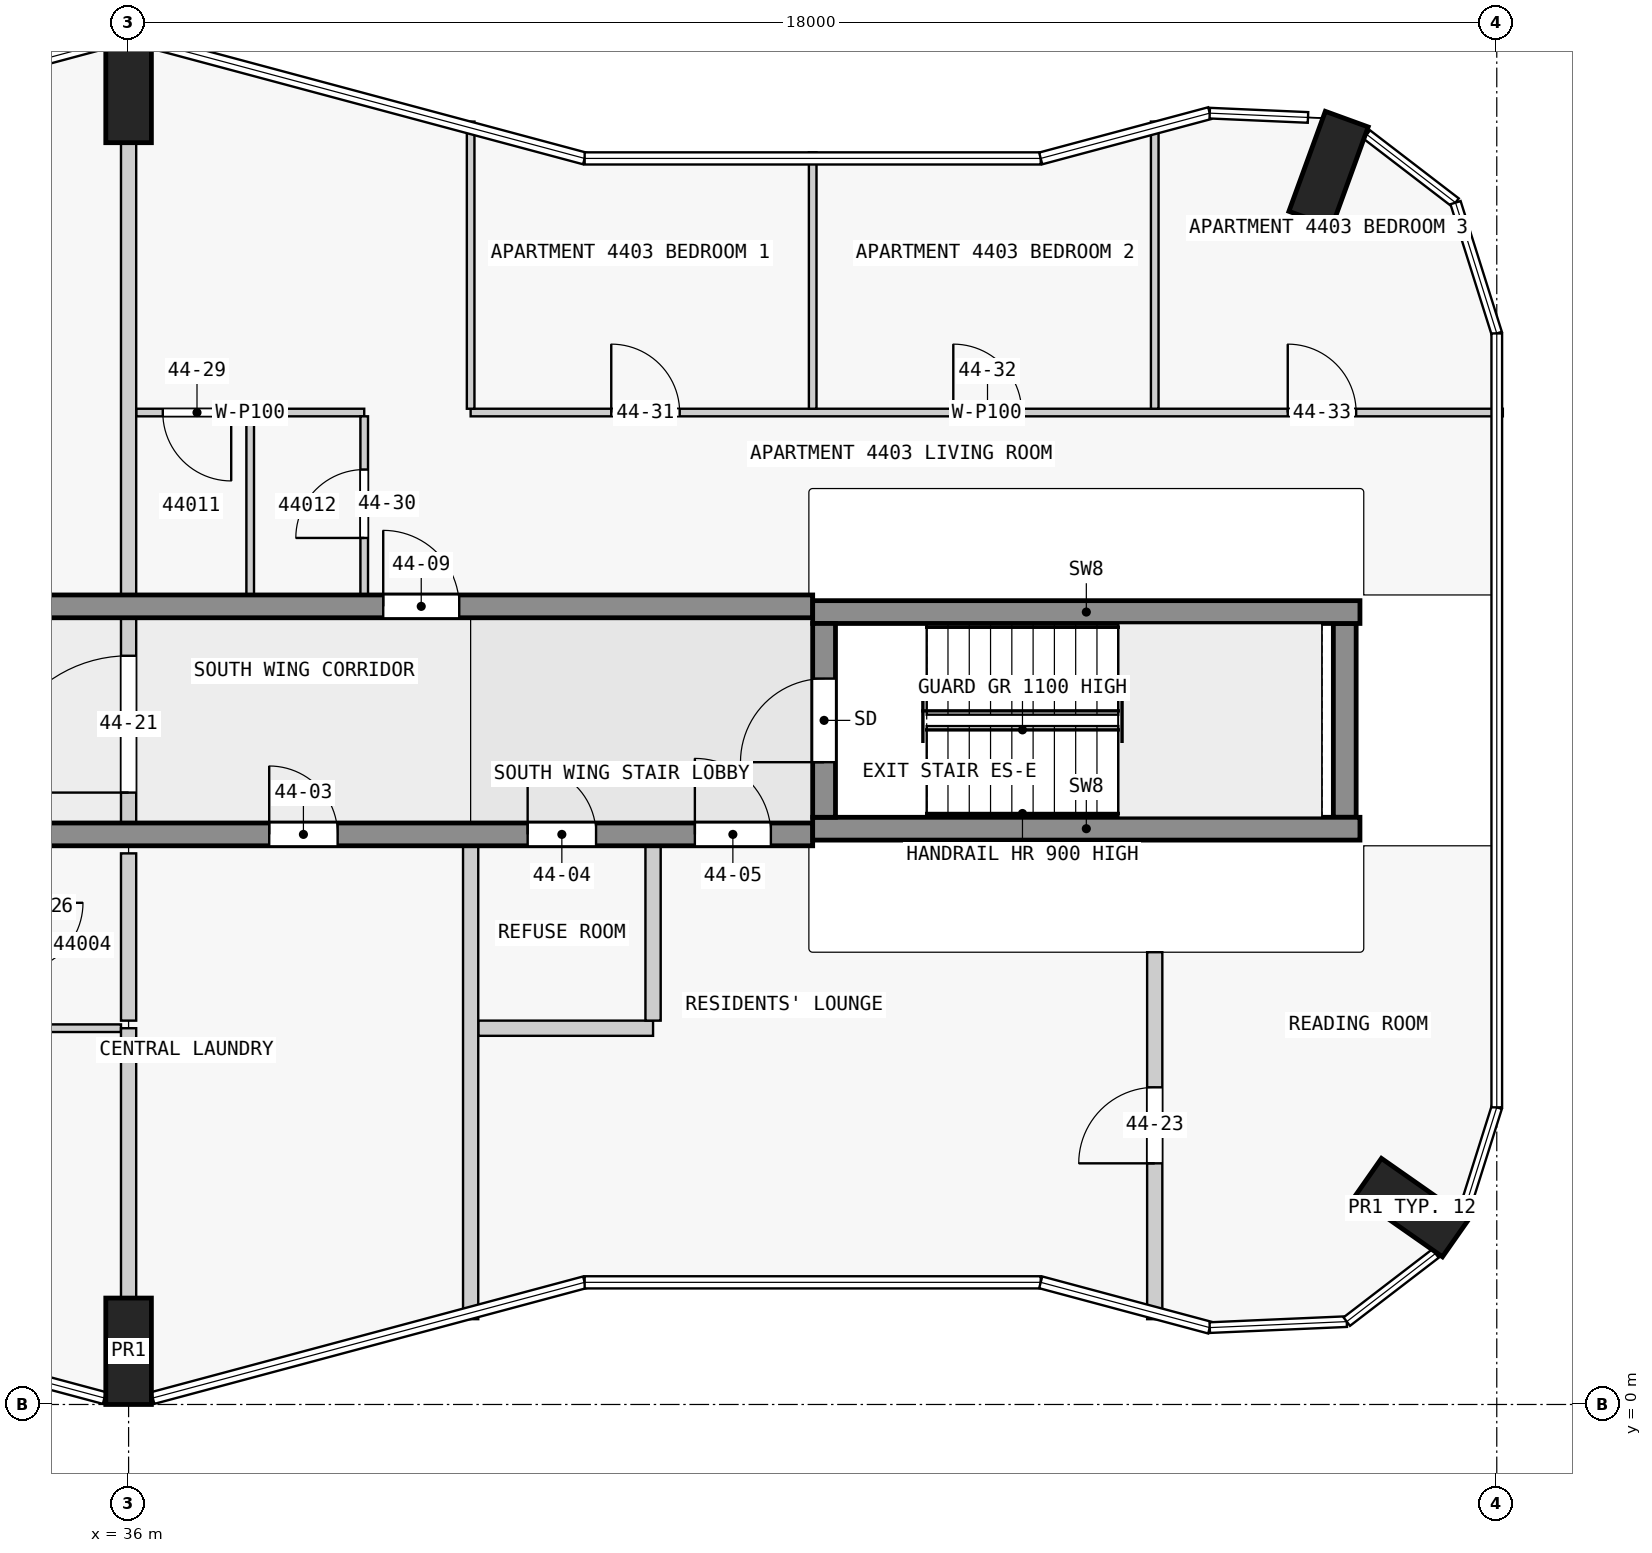
"""IFC4 building model, lengths in metres.
Left out: names, types, materials, properties, quantities, classifications, styles, units other than length and angle.
Written with IfcOpenShell. Run it as: python <this file> out.ifc"""

import sys

from ifc_helpers import new_model, si_unit, direction, frame, frame_2d, origin, origin_2d, place, context, subcontext, project, spatial, rectangle, extrude, element, fill, save


model = new_model("IFC4")
c1 = context("Model", 3, precision=1e-05, world=origin(), true_north=direction((0.0, 1.0)))
c2 = subcontext(c1, "Body", "Model", "MODEL_VIEW")
j1 = project(units=[si_unit("LENGTHUNIT", "METRE"), si_unit("PLANEANGLEUNIT", "RADIAN")], contexts=[c1])
p1 = place(None, origin())
s1 = spatial("IfcSite", under=j1, at=p1, CompositionType="ELEMENT")
p2 = place(p1, origin())
s2 = spatial("IfcBuilding", under=s1, at=p2, CompositionType="ELEMENT")
p3 = place(p2, frame((0.0, 0.0, 170.9)))
s3 = spatial("IfcBuildingStorey", under=s2, at=p3, CompositionType="ELEMENT", Elevation=170.9)
for number, where, z_axis, x_axis in (
    (1, (36.0, 0.7, 0.0), (0.0, 0.0, 1.0), (1.0, 0.0, 0.0)),
    (2, (52.884, 2.59, 0.0), (0.0, 0.0, 1.0), (0.574, 0.819, 0.0)),
    (3, (51.787, 16.252, 0.0), (0.0, 0.0, 1.0), (-0.94, 0.342, 0.0)),
    (4, (36.0, 17.3, 0.0), (0.0, 0.0, 1.0), (1.0, 0.0, 0.0)),
):
    element("IfcColumn", number, at=place(p3, frame(where, z_axis=z_axis, x_axis=x_axis)), inside=s3, PredefinedType="COLUMN", context=c2, shape_type="SweptSolid", body=[
        extrude(rectangle(XDim=0.6, YDim=1.4, at=origin_2d()), origin(), (0.0, 0.0, 1.0), 3.5),
    ])
p4 = place(p3, frame((45.15, 7.725, 0.0), z_axis=(0.0, 0.0, 1.0), x_axis=(0.0, 1.0, 0.0)))
e5 = element("IfcWall", 5, at=p4, inside=s3, PredefinedType="SHEAR", context=c2, shape_type="SweptSolid", body=[
    extrude(rectangle(XDim=2.55, YDim=0.3, at=frame_2d((1.275, 0.0))), origin(), (0.0, 0.0, 1.0), 3.5),
])
p5 = place(p4, frame((0.725, 0.0, 0.0)))
e6 = element("IfcOpeningElement", 6, at=p5, cuts=e5, PredefinedType="OPENING", context=c2, shape_type="SweptSolid", body=[
    extrude(rectangle(XDim=1.1, YDim=2.1, at=frame_2d((0.55, 1.05))), frame((0.0, 0.16, 0.0), z_axis=(0.0, -1.0, 0.0), x_axis=(1.0, 0.0, 0.0)), (0.0, 0.0, 1.0), 0.32),
])
p6 = place(p3, frame((52.0, 7.725, 0.0), z_axis=(0.0, 0.0, 1.0), x_axis=(0.0, 1.0, 0.0)))
e7 = element("IfcWall", 7, at=p6, inside=s3, PredefinedType="SHEAR", context=c2, shape_type="SweptSolid", body=[
    extrude(rectangle(XDim=2.55, YDim=0.3, at=frame_2d((1.275, 0.0))), origin(), (0.0, 0.0, 1.0), 3.5),
])
for number, where, z_axis, x_axis in (
    (8, (45.0, 7.575, 0.0), (0.0, 0.0, 1.0), (1.0, 0.0, 0.0)),
    (9, (45.0, 10.425, 0.0), (0.0, 0.0, 1.0), (1.0, 0.0, 0.0)),
):
    element("IfcWall", number, at=place(p3, frame(where, z_axis=z_axis, x_axis=x_axis)), inside=s3, PredefinedType="SHEAR", context=c2, shape_type="SweptSolid", body=[
        extrude(rectangle(XDim=7.2, YDim=0.3, at=frame_2d((3.6, 0.0))), origin(), (0.0, 0.0, 1.0), 3.5),
    ])
p7 = place(p3, frame((22.5, 7.5, 0.0), z_axis=(0.0, 0.0, 1.0), x_axis=(1.0, 0.0, 0.0)))
e10 = element("IfcWall", 10, at=p7, inside=s3, PredefinedType="SHEAR", context=c2, shape_type="SweptSolid", body=[
    extrude(rectangle(XDim=22.5, YDim=0.3, at=frame_2d((11.25, 0.0))), origin(), (0.0, 0.0, 1.0), 3.25),
])
p8 = place(p7, frame((4.05, 0.0, 0.0)))
e11 = element("IfcOpeningElement", 11, at=p8, cuts=e10, PredefinedType="OPENING", context=c2, shape_type="SweptSolid", body=[
    extrude(rectangle(XDim=1.0, YDim=2.1, at=frame_2d((0.5, 1.05))), frame((0.0, 0.16, 0.0), z_axis=(0.0, -1.0, 0.0), x_axis=(1.0, 0.0, 0.0)), (0.0, 0.0, 1.0), 0.32),
])
p9 = place(p7, frame((10.75, 0.0, 0.0)))
e12 = element("IfcOpeningElement", 12, at=p9, cuts=e10, PredefinedType="OPENING", context=c2, shape_type="SweptSolid", body=[
    extrude(rectangle(XDim=1.0, YDim=2.1, at=frame_2d((0.5, 1.05))), frame((0.0, 0.16, 0.0), z_axis=(0.0, -1.0, 0.0), x_axis=(1.0, 0.0, 0.0)), (0.0, 0.0, 1.0), 0.32),
])
p10 = place(p7, frame((15.35, 0.0, 0.0)))
e13 = element("IfcOpeningElement", 13, at=p10, cuts=e10, PredefinedType="OPENING", context=c2, shape_type="SweptSolid", body=[
    extrude(rectangle(XDim=0.9, YDim=2.1, at=frame_2d((0.45, 1.05))), frame((0.0, 0.16, 0.0), z_axis=(0.0, -1.0, 0.0), x_axis=(1.0, 0.0, 0.0)), (0.0, 0.0, 1.0), 0.32),
])
p11 = place(p7, frame((18.75, 0.0, 0.0)))
e14 = element("IfcOpeningElement", 14, at=p11, cuts=e10, PredefinedType="OPENING", context=c2, shape_type="SweptSolid", body=[
    extrude(rectangle(XDim=0.9, YDim=2.1, at=frame_2d((0.45, 1.05))), frame((0.0, 0.16, 0.0), z_axis=(0.0, -1.0, 0.0), x_axis=(1.0, 0.0, 0.0)), (0.0, 0.0, 1.0), 0.32),
])
p12 = place(p7, frame((20.95, 0.0, 0.0)))
e15 = element("IfcOpeningElement", 15, at=p12, cuts=e10, PredefinedType="OPENING", context=c2, shape_type="SweptSolid", body=[
    extrude(rectangle(XDim=1.0, YDim=2.1, at=frame_2d((0.5, 1.05))), frame((0.0, 0.16, 0.0), z_axis=(0.0, -1.0, 0.0), x_axis=(1.0, 0.0, 0.0)), (0.0, 0.0, 1.0), 0.32),
])
p13 = place(p3, frame((22.5, 10.5, 0.0), z_axis=(0.0, 0.0, 1.0), x_axis=(1.0, 0.0, 0.0)))
e16 = element("IfcWall", 16, at=p13, inside=s3, PredefinedType="SHEAR", context=c2, shape_type="SweptSolid", body=[
    extrude(rectangle(XDim=22.5, YDim=0.3, at=frame_2d((11.25, 0.0))), origin(), (0.0, 0.0, 1.0), 3.25),
])
p14 = place(p13, frame((1.85, 0.0, 0.0)))
e17 = element("IfcOpeningElement", 17, at=p14, cuts=e16, PredefinedType="OPENING", context=c2, shape_type="SweptSolid", body=[
    extrude(rectangle(XDim=0.9, YDim=2.1, at=frame_2d((0.45, 1.05))), frame((0.0, 0.16, 0.0), z_axis=(0.0, -1.0, 0.0), x_axis=(1.0, 0.0, 0.0)), (0.0, 0.0, 1.0), 0.32),
])
p15 = place(p13, frame((6.25, 0.0, 0.0)))
e18 = element("IfcOpeningElement", 18, at=p15, cuts=e16, PredefinedType="OPENING", context=c2, shape_type="SweptSolid", body=[
    extrude(rectangle(XDim=1.0, YDim=2.1, at=frame_2d((0.5, 1.05))), frame((0.0, 0.16, 0.0), z_axis=(0.0, -1.0, 0.0), x_axis=(1.0, 0.0, 0.0)), (0.0, 0.0, 1.0), 0.32),
])
p16 = place(p13, frame((10.35, 0.0, 0.0)))
e19 = element("IfcOpeningElement", 19, at=p16, cuts=e16, PredefinedType="OPENING", context=c2, shape_type="SweptSolid", body=[
    extrude(rectangle(XDim=1.8, YDim=2.1, at=frame_2d((0.9, 1.05))), frame((0.0, 0.16, 0.0), z_axis=(0.0, -1.0, 0.0), x_axis=(1.0, 0.0, 0.0)), (0.0, 0.0, 1.0), 0.32),
])
p17 = place(p13, frame((16.85, 0.0, 0.0)))
e20 = element("IfcOpeningElement", 20, at=p17, cuts=e16, PredefinedType="OPENING", context=c2, shape_type="SweptSolid", body=[
    extrude(rectangle(XDim=1.0, YDim=2.1, at=frame_2d((0.5, 1.05))), frame((0.0, 0.16, 0.0), z_axis=(0.0, -1.0, 0.0), x_axis=(1.0, 0.0, 0.0)), (0.0, 0.0, 1.0), 0.32),
])
p18 = place(p3, frame((34.55, 4.95, 0.0), z_axis=(0.0, 0.0, 1.0), x_axis=(1.0, 0.0, 0.0)))
e21 = element("IfcWall", 21, at=p18, inside=s3, PredefinedType="PARTITIONING", context=c2, shape_type="SweptSolid", body=[
    extrude(rectangle(XDim=1.35, YDim=0.1, at=frame_2d((0.675, 0.0))), origin(), (0.0, 0.0, 1.0), 3.25),
])
p19 = place(p3, frame((40.6, 4.95, 0.0), z_axis=(0.0, 0.0, 1.0), x_axis=(1.0, 0.0, 0.0)))
e22 = element("IfcWall", 22, at=p19, inside=s3, PredefinedType="PARTITIONING", context=c2, shape_type="SweptSolid", body=[
    extrude(rectangle(XDim=2.3, YDim=0.2, at=frame_2d((1.15, 0.0))), origin(), (0.0, 0.0, 1.0), 3.25),
])
p20 = place(p3, frame((39.1, 13.05, 0.0), z_axis=(0.0, 0.0, 1.0), x_axis=(-1.0, 0.0, 0.0)))
e23 = element("IfcWall", 23, at=p20, inside=s3, PredefinedType="PARTITIONING", context=c2, shape_type="SweptSolid", body=[
    extrude(rectangle(XDim=3.0, YDim=0.1, at=frame_2d((1.5, 0.0))), origin(), (0.0, 0.0, 1.0), 3.25),
])
p21 = place(p20, frame((1.75, 0.0, 0.0)))
e24 = element("IfcOpeningElement", 24, at=p21, cuts=e23, PredefinedType="OPENING", context=c2, shape_type="SweptSolid", body=[
    extrude(rectangle(XDim=0.9, YDim=2.1, at=frame_2d((0.45, 1.05))), frame((0.0, 0.06, 0.0), z_axis=(0.0, -1.0, 0.0), x_axis=(1.0, 0.0, 0.0)), (0.0, 0.0, 1.0), 0.12),
])
p22 = place(p3, frame((40.5, 13.05, 0.0), z_axis=(0.0, 0.0, 1.0), x_axis=(1.0, 0.0, 0.0)))
e25 = element("IfcWall", 25, at=p22, inside=s3, PredefinedType="PARTITIONING", context=c2, shape_type="SweptSolid", body=[
    extrude(rectangle(XDim=13.58, YDim=0.1, at=frame_2d((6.79, 0.0))), origin(), (0.0, 0.0, 1.0), 3.25),
])
p23 = place(p22, frame((1.85, 0.0, 0.0)))
e26 = element("IfcOpeningElement", 26, at=p23, cuts=e25, PredefinedType="OPENING", context=c2, shape_type="SweptSolid", body=[
    extrude(rectangle(XDim=0.9, YDim=2.1, at=frame_2d((0.45, 1.05))), frame((0.0, 0.06, 0.0), z_axis=(0.0, -1.0, 0.0), x_axis=(1.0, 0.0, 0.0)), (0.0, 0.0, 1.0), 0.12),
])
p24 = place(p22, frame((6.35, 0.0, 0.0)))
e27 = element("IfcOpeningElement", 27, at=p24, cuts=e25, PredefinedType="OPENING", context=c2, shape_type="SweptSolid", body=[
    extrude(rectangle(XDim=0.9, YDim=2.1, at=frame_2d((0.45, 1.05))), frame((0.0, 0.06, 0.0), z_axis=(0.0, -1.0, 0.0), x_axis=(1.0, 0.0, 0.0)), (0.0, 0.0, 1.0), 0.12),
])
p25 = place(p22, frame((10.75, 0.0, 0.0)))
e28 = element("IfcOpeningElement", 28, at=p25, cuts=e25, PredefinedType="OPENING", context=c2, shape_type="SweptSolid", body=[
    extrude(rectangle(XDim=0.9, YDim=2.1, at=frame_2d((0.45, 1.05))), frame((0.0, 0.06, 0.0), z_axis=(0.0, -1.0, 0.0), x_axis=(1.0, 0.0, 0.0)), (0.0, 0.0, 1.0), 0.12),
])
p26 = place(p3, frame((36.0, 4.95, 0.0), z_axis=(0.0, 0.0, 1.0), x_axis=(0.0, -1.0, 0.0)))
e29 = element("IfcWall", 29, at=p26, inside=s3, PredefinedType="PARTITIONING", context=c2, shape_type="SweptSolid", body=[
    extrude(rectangle(XDim=3.55, YDim=0.2, at=frame_2d((1.775, 0.0))), origin(), (0.0, 0.0, 1.0), 3.25),
])
p27 = place(p3, frame((36.0, 5.05, 0.0), z_axis=(0.0, 0.0, 1.0), x_axis=(0.0, 1.0, 0.0)))
e30 = element("IfcWall", 30, at=p27, inside=s3, PredefinedType="PARTITIONING", context=c2, shape_type="SweptSolid", body=[
    extrude(rectangle(XDim=2.2, YDim=0.2, at=frame_2d((1.1, 0.0))), origin(), (0.0, 0.0, 1.0), 3.25),
])
p28 = place(p3, frame((36.0, 10.65, 0.0), z_axis=(0.0, 0.0, 1.0), x_axis=(0.0, 1.0, 0.0)))
e31 = element("IfcWall", 31, at=p28, inside=s3, PredefinedType="PARTITIONING", context=c2, shape_type="SweptSolid", body=[
    extrude(rectangle(XDim=5.95, YDim=0.2, at=frame_2d((2.975, 0.0))), origin(), (0.0, 0.0, 1.0), 3.25),
])
p29 = place(p3, frame((37.6, 10.65, 0.0), z_axis=(0.0, 0.0, 1.0), x_axis=(0.0, 1.0, 0.0)))
e32 = element("IfcWall", 32, at=p29, inside=s3, PredefinedType="PARTITIONING", context=c2, shape_type="SweptSolid", body=[
    extrude(rectangle(XDim=2.35, YDim=0.1, at=frame_2d((1.175, 0.0))), origin(), (0.0, 0.0, 1.0), 3.25),
])
p30 = place(p3, frame((39.1, 10.65, 0.0), z_axis=(0.0, 0.0, 1.0), x_axis=(0.0, 1.0, 0.0)))
e33 = element("IfcWall", 33, at=p30, inside=s3, PredefinedType="PARTITIONING", context=c2, shape_type="SweptSolid", body=[
    extrude(rectangle(XDim=2.35, YDim=0.1, at=frame_2d((1.175, 0.0))), origin(), (0.0, 0.0, 1.0), 3.25),
])
p31 = place(p30, frame((0.75, 0.0, 0.0)))
e34 = element("IfcOpeningElement", 34, at=p31, cuts=e33, PredefinedType="OPENING", context=c2, shape_type="SweptSolid", body=[
    extrude(rectangle(XDim=0.9, YDim=2.1, at=frame_2d((0.45, 1.05))), frame((0.0, 0.06, 0.0), z_axis=(0.0, -1.0, 0.0), x_axis=(1.0, 0.0, 0.0)), (0.0, 0.0, 1.0), 0.12),
])
p32 = place(p3, frame((40.5, 16.878, 0.0), z_axis=(0.0, 0.0, 1.0), x_axis=(0.0, -1.0, 0.0)))
e35 = element("IfcWall", 35, at=p32, inside=s3, PredefinedType="PARTITIONING", context=c2, shape_type="SweptSolid", body=[
    extrude(rectangle(XDim=3.778, YDim=0.1, at=frame_2d((1.889, 0.0))), origin(), (0.0, 0.0, 1.0), 3.25),
])
p33 = place(p3, frame((40.5, 1.122, 0.0), z_axis=(0.0, 0.0, 1.0), x_axis=(0.0, 1.0, 0.0)))
e36 = element("IfcWall", 36, at=p33, inside=s3, PredefinedType="PARTITIONING", context=c2, shape_type="SweptSolid", body=[
    extrude(rectangle(XDim=6.228, YDim=0.2, at=frame_2d((3.114, 0.0))), origin(), (0.0, 0.0, 1.0), 3.25),
])
p34 = place(p3, frame((42.9, 5.05, 0.0), z_axis=(0.0, 0.0, 1.0), x_axis=(0.0, 1.0, 0.0)))
e37 = element("IfcWall", 37, at=p34, inside=s3, PredefinedType="PARTITIONING", context=c2, shape_type="SweptSolid", body=[
    extrude(rectangle(XDim=2.3, YDim=0.2, at=frame_2d((1.15, 0.0))), origin(), (0.0, 0.0, 1.0), 3.25),
])
p35 = place(p3, frame((45.0, 13.1, 0.0), z_axis=(0.0, 0.0, 1.0), x_axis=(0.0, 1.0, 0.0)))
e38 = element("IfcWall", 38, at=p35, inside=s3, PredefinedType="PARTITIONING", context=c2, shape_type="SweptSolid", body=[
    extrude(rectangle(XDim=3.373, YDim=0.1, at=frame_2d((1.687, 0.0))), origin(), (0.0, 0.0, 1.0), 3.25),
])
p36 = place(p3, frame((49.5, 13.1, 0.0), z_axis=(0.0, 0.0, 1.0), x_axis=(0.0, 1.0, 0.0)))
e39 = element("IfcWall", 39, at=p36, inside=s3, PredefinedType="PARTITIONING", context=c2, shape_type="SweptSolid", body=[
    extrude(rectangle(XDim=3.778, YDim=0.1, at=frame_2d((1.889, 0.0))), origin(), (0.0, 0.0, 1.0), 3.25),
])
p37 = place(p3, frame((49.5, 1.122, 0.0), z_axis=(0.0, 0.0, 1.0), x_axis=(0.0, 1.0, 0.0)))
e40 = element("IfcWall", 40, at=p37, inside=s3, PredefinedType="PARTITIONING", context=c2, shape_type="SweptSolid", body=[
    extrude(rectangle(XDim=4.828, YDim=0.2, at=frame_2d((2.414, 0.0))), origin(), (0.0, 0.0, 1.0), 3.25),
])
p38 = place(p37, frame((2.05, 0.0, 0.0)))
e41 = element("IfcOpeningElement", 41, at=p38, cuts=e40, PredefinedType="OPENING", context=c2, shape_type="SweptSolid", body=[
    extrude(rectangle(XDim=1.0, YDim=2.1, at=frame_2d((0.5, 1.05))), frame((0.0, 0.11, 0.0), z_axis=(0.0, -1.0, 0.0), x_axis=(1.0, 0.0, 0.0)), (0.0, 0.0, 1.0), 0.22),
])
p39 = place(p3, frame((36.0, 7.35, 0.0), z_axis=(0.0, 0.0, 1.0), x_axis=(0.0, 1.0, 0.0)))
e42 = element("IfcWall", 42, at=p39, inside=s3, PredefinedType="PARTITIONING", context=c2, shape_type="SweptSolid", body=[
    extrude(rectangle(XDim=3.2, YDim=0.2, at=frame_2d((1.6, 0.0))), origin(), (0.0, 0.0, 1.0), 3.25),
])
p40 = place(p39, frame((0.7, 0.0, 0.0)))
e43 = element("IfcOpeningElement", 43, at=p40, cuts=e42, PredefinedType="OPENING", context=c2, shape_type="SweptSolid", body=[
    extrude(rectangle(XDim=1.8, YDim=2.1, at=frame_2d((0.9, 1.05))), frame((0.0, 0.11, 0.0), z_axis=(0.0, -1.0, 0.0), x_axis=(1.0, 0.0, 0.0)), (0.0, 0.0, 1.0), 0.22),
])
p41 = place(p5, origin())
e44 = element("IfcDoor", 44, at=p41, inside=s3, OperationType="SINGLE_SWING_LEFT", PredefinedType="DOOR", context=c2, shape_type="SweptSolid", body=[
    extrude(rectangle(XDim=1.1, YDim=2.1, at=frame_2d((0.55, 1.05))), frame((0.0, 0.025, 0.0), z_axis=(0.0, -1.0, 0.0), x_axis=(1.0, 0.0, 0.0)), (0.0, 0.0, 1.0), 0.05),
])
fill(e6, e44)
p42 = place(p10, origin())
e45 = element("IfcDoor", 45, at=p42, inside=s3, OperationType="SINGLE_SWING_RIGHT", PredefinedType="DOOR", context=c2, shape_type="SweptSolid", body=[
    extrude(rectangle(XDim=0.9, YDim=2.1, at=frame_2d((0.45, 1.05))), frame((0.0, 0.025, 0.0), z_axis=(0.0, -1.0, 0.0), x_axis=(1.0, 0.0, 0.0)), (0.0, 0.0, 1.0), 0.05),
])
fill(e13, e45)
p43 = place(p11, origin())
e46 = element("IfcDoor", 46, at=p43, inside=s3, OperationType="SINGLE_SWING_RIGHT", PredefinedType="DOOR", context=c2, shape_type="SweptSolid", body=[
    extrude(rectangle(XDim=0.9, YDim=2.1, at=frame_2d((0.45, 1.05))), frame((0.0, 0.025, 0.0), z_axis=(0.0, -1.0, 0.0), x_axis=(1.0, 0.0, 0.0)), (0.0, 0.0, 1.0), 0.05),
])
fill(e14, e46)
p44 = place(p12, origin())
e47 = element("IfcDoor", 47, at=p44, inside=s3, OperationType="SINGLE_SWING_RIGHT", PredefinedType="DOOR", context=c2, shape_type="SweptSolid", body=[
    extrude(rectangle(XDim=1.0, YDim=2.1, at=frame_2d((0.5, 1.05))), frame((0.0, 0.025, 0.0), z_axis=(0.0, -1.0, 0.0), x_axis=(1.0, 0.0, 0.0)), (0.0, 0.0, 1.0), 0.05),
])
fill(e15, e47)
p45 = place(p17, origin())
e48 = element("IfcDoor", 48, at=p45, inside=s3, OperationType="SINGLE_SWING_RIGHT", PredefinedType="DOOR", context=c2, shape_type="SweptSolid", body=[
    extrude(rectangle(XDim=1.0, YDim=2.1, at=frame_2d((0.5, 1.05))), frame((0.0, 0.025, 0.0), z_axis=(0.0, -1.0, 0.0), x_axis=(1.0, 0.0, 0.0)), (0.0, 0.0, 1.0), 0.05),
])
fill(e20, e48)
p46 = place(p40, origin())
e49 = element("IfcDoor", 49, at=p46, inside=s3, OperationType="SINGLE_SWING_LEFT", PredefinedType="DOOR", context=c2, shape_type="SweptSolid", body=[
    extrude(rectangle(XDim=1.8, YDim=2.1, at=frame_2d((0.9, 1.05))), frame((0.0, 0.025, 0.0), z_axis=(0.0, -1.0, 0.0), x_axis=(1.0, 0.0, 0.0)), (0.0, 0.0, 1.0), 0.05),
])
fill(e43, e49)
p47 = place(p38, origin())
e50 = element("IfcDoor", 50, at=p47, inside=s3, OperationType="SINGLE_SWING_RIGHT", PredefinedType="DOOR", context=c2, shape_type="SweptSolid", body=[
    extrude(rectangle(XDim=1.0, YDim=2.1, at=frame_2d((0.5, 1.05))), frame((0.0, 0.025, 0.0), z_axis=(0.0, -1.0, 0.0), x_axis=(1.0, 0.0, 0.0)), (0.0, 0.0, 1.0), 0.05),
])
fill(e41, e50)
p48 = place(p21, origin())
e51 = element("IfcDoor", 51, at=p48, inside=s3, OperationType="SINGLE_SWING_RIGHT", PredefinedType="DOOR", context=c2, shape_type="SweptSolid", body=[
    extrude(rectangle(XDim=0.9, YDim=2.1, at=frame_2d((0.45, 1.05))), frame((0.0, 0.025, 0.0), z_axis=(0.0, -1.0, 0.0), x_axis=(1.0, 0.0, 0.0)), (0.0, 0.0, 1.0), 0.05),
])
fill(e24, e51)
p49 = place(p31, origin())
e52 = element("IfcDoor", 52, at=p49, inside=s3, OperationType="SINGLE_SWING_RIGHT", PredefinedType="DOOR", context=c2, shape_type="SweptSolid", body=[
    extrude(rectangle(XDim=0.9, YDim=2.1, at=frame_2d((0.45, 1.05))), frame((0.0, 0.025, 0.0), z_axis=(0.0, -1.0, 0.0), x_axis=(1.0, 0.0, 0.0)), (0.0, 0.0, 1.0), 0.05),
])
fill(e34, e52)
p50 = place(p23, origin())
e53 = element("IfcDoor", 53, at=p50, inside=s3, OperationType="SINGLE_SWING_LEFT", PredefinedType="DOOR", context=c2, shape_type="SweptSolid", body=[
    extrude(rectangle(XDim=0.9, YDim=2.1, at=frame_2d((0.45, 1.05))), frame((0.0, 0.025, 0.0), z_axis=(0.0, -1.0, 0.0), x_axis=(1.0, 0.0, 0.0)), (0.0, 0.0, 1.0), 0.05),
])
fill(e26, e53)
p51 = place(p24, origin())
e54 = element("IfcDoor", 54, at=p51, inside=s3, OperationType="SINGLE_SWING_RIGHT", PredefinedType="DOOR", context=c2, shape_type="SweptSolid", body=[
    extrude(rectangle(XDim=0.9, YDim=2.1, at=frame_2d((0.45, 1.05))), frame((0.0, 0.025, 0.0), z_axis=(0.0, -1.0, 0.0), x_axis=(1.0, 0.0, 0.0)), (0.0, 0.0, 1.0), 0.05),
])
fill(e27, e54)
p52 = place(p25, origin())
e55 = element("IfcDoor", 55, at=p52, inside=s3, OperationType="SINGLE_SWING_RIGHT", PredefinedType="DOOR", context=c2, shape_type="SweptSolid", body=[
    extrude(rectangle(XDim=0.9, YDim=2.1, at=frame_2d((0.45, 1.05))), frame((0.0, 0.025, 0.0), z_axis=(0.0, -1.0, 0.0), x_axis=(1.0, 0.0, 0.0)), (0.0, 0.0, 1.0), 0.05),
])
fill(e28, e55)
save(model, sys.argv[1])
